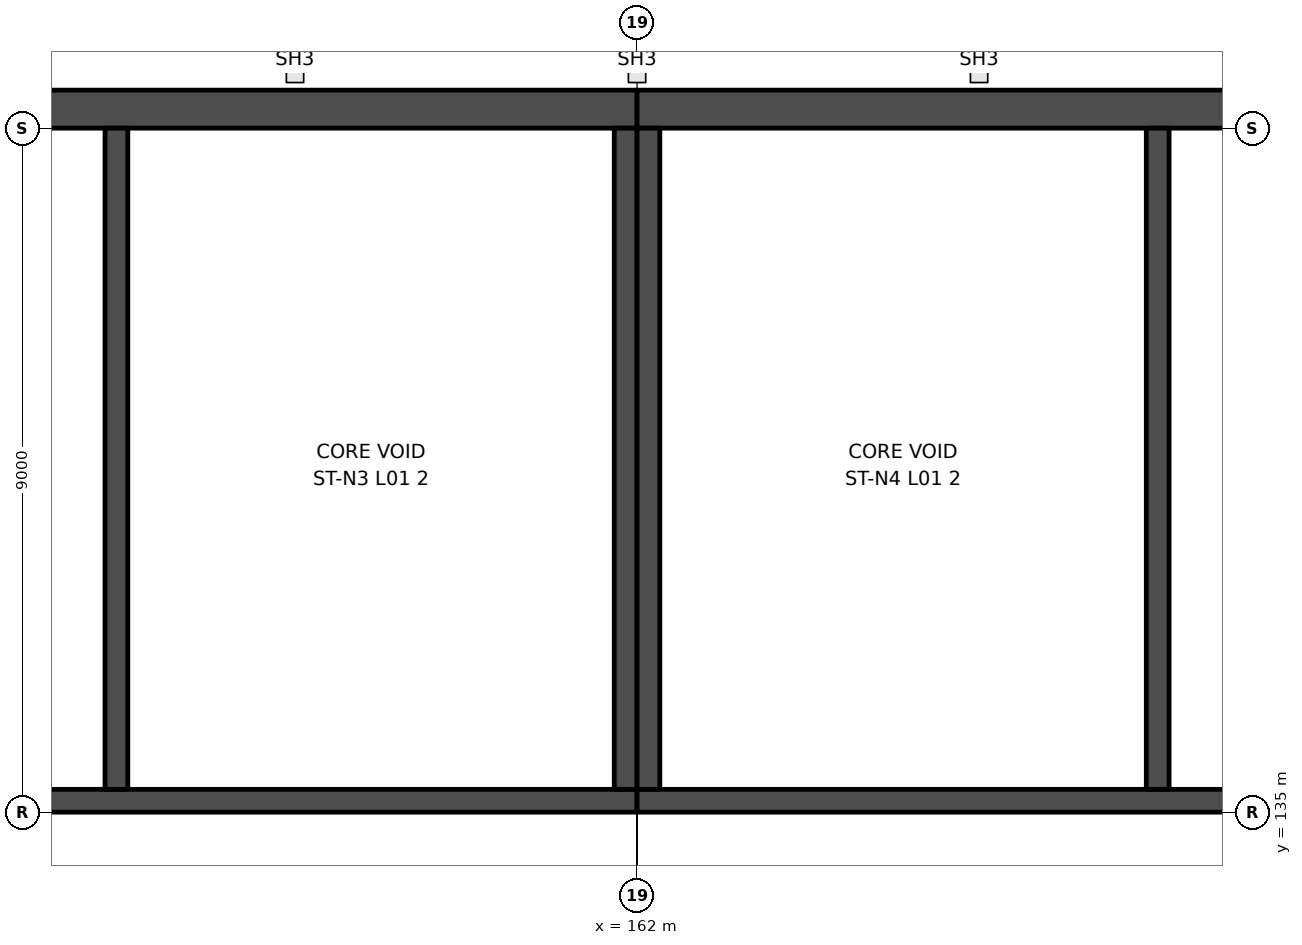
"""IFC4 building model, lengths in metres.
Left out: names, types, materials, properties, quantities, classifications, styles, units other than length and angle.
Written with IfcOpenShell. Run it as: python <this file> out.ifc"""

import sys

from ifc_helpers import new_model, si_unit, direction, frame, frame_2d, origin, place, context, subcontext, project, spatial, rectangle, extrude, element, save


model = new_model("IFC4")
c1 = context("Model", 3, precision=1e-05, world=origin(), true_north=direction((0.0, 1.0)))
c2 = subcontext(c1, "Body", "Model", "MODEL_VIEW")
j1 = project(units=[si_unit("LENGTHUNIT", "METRE"), si_unit("PLANEANGLEUNIT", "RADIAN")], contexts=[c1])
p1 = place(None, origin())
s1 = spatial("IfcSite", under=j1, at=p1, CompositionType="ELEMENT")
p2 = place(p1, origin())
s2 = spatial("IfcBuilding", under=s1, at=p2, CompositionType="ELEMENT")
p3 = place(p2, frame((0.0, 0.0, 7.0)))
s3 = spatial("IfcBuildingStorey", under=s2, at=p3, CompositionType="ELEMENT", Elevation=7.0)
p4 = place(p3, frame((144.0, 135.15, 0.0), z_axis=(0.0, 0.0, 1.0), x_axis=(1.0, 0.0, 0.0)))
e1 = element("IfcWall", 1, at=p4, inside=s3, PredefinedType="SHEAR", context=c2, shape_type="SweptSolid", body=[
    extrude(rectangle(XDim=18.0, YDim=0.3, at=frame_2d((9.0, 0.0))), origin(), (0.0, 0.0, 1.0), 4.5),
])
p5 = place(p4, frame((1.5, 0.0, 0.0)))
e2 = element("IfcOpeningElement", 2, at=p5, cuts=e1, PredefinedType="OPENING", context=c2, shape_type="SweptSolid", body=[
    extrude(rectangle(XDim=1.2, YDim=2.1, at=frame_2d((0.6, 1.05))), frame((0.0, 0.16, 0.0), z_axis=(0.0, -1.0, 0.0), x_axis=(1.0, 0.0, 0.0)), (0.0, 0.0, 1.0), 0.32),
])
p6 = place(p3, frame((144.0, 144.25, 0.0), z_axis=(0.0, 0.0, 1.0), x_axis=(1.0, 0.0, 0.0)))
e3 = element("IfcWall", 3, at=p6, inside=s3, PredefinedType="SHEAR", context=c2, shape_type="SweptSolid", body=[
    extrude(rectangle(XDim=18.0, YDim=0.5, at=frame_2d((9.0, 0.0))), origin(), (0.0, 0.0, 1.0), 4.5),
])
for number, where, z_axis, x_axis in (
    (4, (161.85, 135.3, 0.0), (0.0, 0.0, 1.0), (0.0, 1.0, 0.0)),
    (5, (155.15, 135.3, 0.0), (0.0, 0.0, 1.0), (0.0, 1.0, 0.0)),
):
    element("IfcWall", number, at=place(p3, frame(where, z_axis=z_axis, x_axis=x_axis)), inside=s3, PredefinedType="SHEAR", context=c2, shape_type="SweptSolid", body=[
        extrude(rectangle(XDim=8.7, YDim=0.3, at=frame_2d((4.35, 0.0))), origin(), (0.0, 0.0, 1.0), 4.5),
    ])
p7 = place(p3, frame((180.0, 135.15, 0.0), z_axis=(0.0, 0.0, 1.0), x_axis=(-1.0, 0.0, 0.0)))
e6 = element("IfcWall", 6, at=p7, inside=s3, PredefinedType="SHEAR", context=c2, shape_type="SweptSolid", body=[
    extrude(rectangle(XDim=18.0, YDim=0.3, at=frame_2d((9.0, 0.0))), origin(), (0.0, 0.0, 1.0), 4.5),
])
p8 = place(p7, frame((8.6, 0.0, 0.0)))
e7 = element("IfcOpeningElement", 7, at=p8, cuts=e6, PredefinedType="OPENING", context=c2, shape_type="SweptSolid", body=[
    extrude(rectangle(XDim=1.2, YDim=2.1, at=frame_2d((0.6, 1.05))), frame((0.0, 0.16, 0.0), z_axis=(0.0, -1.0, 0.0), x_axis=(1.0, 0.0, 0.0)), (0.0, 0.0, 1.0), 0.32),
])
p9 = place(p3, frame((180.0, 144.25, 0.0), z_axis=(0.0, 0.0, 1.0), x_axis=(-1.0, 0.0, 0.0)))
e8 = element("IfcWall", 8, at=p9, inside=s3, PredefinedType="SHEAR", context=c2, shape_type="SweptSolid", body=[
    extrude(rectangle(XDim=18.0, YDim=0.5, at=frame_2d((9.0, 0.0))), origin(), (0.0, 0.0, 1.0), 4.5),
])
for number, where, z_axis, x_axis in (
    (9, (162.15, 135.3, 0.0), (0.0, 0.0, 1.0), (0.0, 1.0, 0.0)),
    (10, (168.85, 135.3, 0.0), (0.0, 0.0, 1.0), (0.0, 1.0, 0.0)),
):
    element("IfcWall", number, at=place(p3, frame(where, z_axis=z_axis, x_axis=x_axis)), inside=s3, PredefinedType="SHEAR", context=c2, shape_type="SweptSolid", body=[
        extrude(rectangle(XDim=8.7, YDim=0.3, at=frame_2d((4.35, 0.0))), origin(), (0.0, 0.0, 1.0), 4.5),
    ])
save(model, sys.argv[1])
